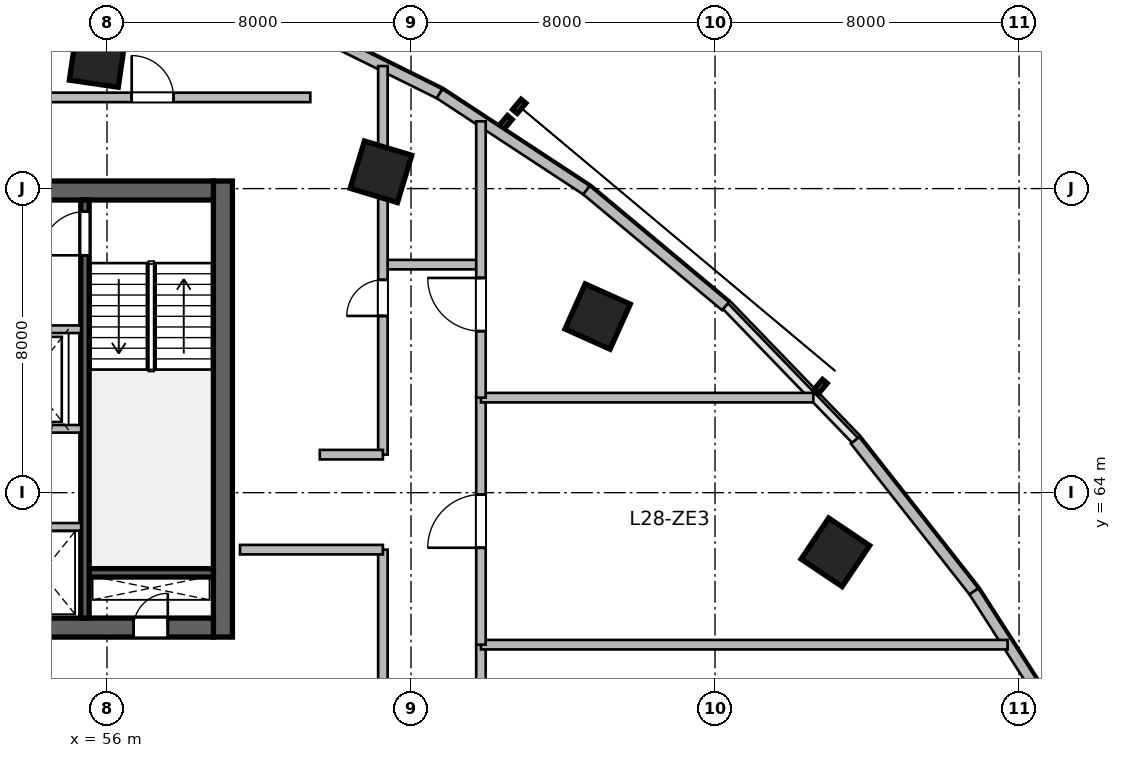
"""IFC4 building model, lengths in metres.
Left out: names, types, materials, properties, quantities, classifications, styles, units other than length and angle.
Written with IfcOpenShell. Run it as: python <this file> out.ifc"""

import sys

from ifc_helpers import new_model, si_unit, direction, frame, frame_2d, origin, origin_2d, place, context, subcontext, project, spatial, rectangle, extrude, source, transform, mapped, element, fill, save


model = new_model("IFC4")
c1 = context("Model", 3, precision=1e-05, world=origin(), true_north=direction((0.0, 1.0)))
c2 = subcontext(c1, "Body", "Model", "MODEL_VIEW")
j1 = project(units=[si_unit("LENGTHUNIT", "METRE"), si_unit("PLANEANGLEUNIT", "RADIAN")], contexts=[c1])
p1 = place(None, origin())
s1 = spatial("IfcSite", under=j1, at=p1, CompositionType="ELEMENT")
p2 = place(p1, origin())
s2 = spatial("IfcBuilding", under=s1, at=p2, CompositionType="ELEMENT")
p3 = place(p2, frame((0.0, 0.0, 119.4)))
s3 = spatial("IfcBuildingStorey", under=s2, at=p3, CompositionType="ELEMENT", Elevation=119.4)
m1 = source(origin(), c2, "Body", "SweptSolid", [
    extrude(rectangle(XDim=12.0, YDim=0.5, at=frame_2d((6.0, 0.0))), origin(), (0.0, 0.0, 1.0), 3.9),
])
p4 = place(p3, frame((59.05, 60.2, 0.0), z_axis=(0.0, 0.0, 1.0), x_axis=(0.0, 1.0, 0.0)))
e1 = element("IfcWall", 1, at=p4, inside=s3, PredefinedType="SHEAR", context=c2, shape_type="MappedRepresentation", body=[
    mapped(m1, transform((0.0, 0.0, 0.0), scale=1.0)),
])
m2 = source(origin(), c2, "Body", "SweptSolid", [
    extrude(rectangle(XDim=21.6, YDim=0.5, at=frame_2d((10.8, 0.0))), origin(), (0.0, 0.0, 1.0), 3.9),
])
p5 = place(p3, frame((37.2, 60.45, 0.0), z_axis=(0.0, 0.0, 1.0), x_axis=(1.0, 0.0, 0.0)))
e2 = element("IfcWall", 2, at=p5, inside=s3, PredefinedType="SHEAR", context=c2, shape_type="MappedRepresentation", body=[
    mapped(m2, transform((0.0, 0.0, 0.0), scale=1.0)),
])
p6 = place(p5, frame((1.1, 0.0, 0.0)))
e3 = element("IfcOpeningElement", 3, at=p6, cuts=e2, PredefinedType="OPENING", context=c2, shape_type="SweptSolid", body=[
    extrude(rectangle(XDim=1.15, YDim=2.15, at=frame_2d((0.575, 1.075))), frame((0.0, 0.26, 0.0), z_axis=(0.0, -1.0, 0.0), x_axis=(1.0, 0.0, 0.0)), (0.0, 0.0, 1.0), 0.52),
])
p7 = place(p5, frame((19.5, 0.0, 0.0)))
e4 = element("IfcOpeningElement", 4, at=p7, cuts=e2, PredefinedType="OPENING", context=c2, shape_type="SweptSolid", body=[
    extrude(rectangle(XDim=0.9, YDim=2.1, at=frame_2d((0.45, 1.05))), frame((0.0, 0.26, 0.0), z_axis=(0.0, -1.0, 0.0), x_axis=(1.0, 0.0, 0.0)), (0.0, 0.0, 1.0), 0.52),
])
p8 = place(p5, frame((12.02, 0.0, 0.0)))
e5 = element("IfcOpeningElement", 5, at=p8, cuts=e2, PredefinedType="OPENING", context=c2, shape_type="SweptSolid", body=[
    extrude(rectangle(XDim=1.6, YDim=2.15, at=frame_2d((0.8, 1.075))), frame((0.0, 0.26, 0.0), z_axis=(0.0, -1.0, 0.0), x_axis=(1.0, 0.0, 0.0)), (0.0, 0.0, 1.0), 0.52),
])
p9 = place(p3, frame((37.2, 71.95, 0.0), z_axis=(0.0, 0.0, 1.0), x_axis=(1.0, 0.0, 0.0)))
e6 = element("IfcWall", 6, at=p9, inside=s3, PredefinedType="SHEAR", context=c2, shape_type="MappedRepresentation", body=[
    mapped(m2, transform((0.0, 0.0, 0.0), scale=1.0)),
])
p10 = place(p9, frame((1.2, 0.0, 0.0)))
e7 = element("IfcOpeningElement", 7, at=p10, cuts=e6, PredefinedType="OPENING", context=c2, shape_type="SweptSolid", body=[
    extrude(rectangle(XDim=0.9, YDim=2.1, at=frame_2d((0.45, 1.05))), frame((0.0, 0.26, 0.0), z_axis=(0.0, -1.0, 0.0), x_axis=(1.0, 0.0, 0.0)), (0.0, 0.0, 1.0), 0.52),
])
p11 = place(p9, frame((14.7, 0.0, 0.0)))
e8 = element("IfcOpeningElement", 8, at=p11, cuts=e6, PredefinedType="OPENING", context=c2, shape_type="SweptSolid", body=[
    extrude(rectangle(XDim=1.2, YDim=2.15, at=frame_2d((0.6, 1.075))), frame((0.0, 0.26, 0.0), z_axis=(0.0, -1.0, 0.0), x_axis=(1.0, 0.0, 0.0)), (0.0, 0.0, 1.0), 0.52),
])
p12 = place(p9, frame((4.15, 0.0, 0.0)))
e9 = element("IfcOpeningElement", 9, at=p12, cuts=e6, PredefinedType="OPENING", context=c2, shape_type="SweptSolid", body=[
    extrude(rectangle(XDim=1.3, YDim=2.15, at=frame_2d((0.65, 1.075))), frame((0.0, 0.26, 0.0), z_axis=(0.0, -1.0, 0.0), x_axis=(1.0, 0.0, 0.0)), (0.0, 0.0, 1.0), 0.52),
])
p13 = place(p9, frame((7.25, 0.0, 0.0)))
e10 = element("IfcOpeningElement", 10, at=p13, cuts=e6, PredefinedType="OPENING", context=c2, shape_type="SweptSolid", body=[
    extrude(rectangle(XDim=0.9, YDim=2.1, at=frame_2d((0.45, 1.05))), frame((0.0, 0.26, 0.0), z_axis=(0.0, -1.0, 0.0), x_axis=(1.0, 0.0, 0.0)), (0.0, 0.0, 1.0), 0.52),
])
m3 = source(origin(), c2, "Body", "SweptSolid", [
    extrude(rectangle(XDim=3.27, YDim=0.22, at=frame_2d((1.635, 0.0))), origin(), (0.0, 0.0, 1.0), 3.9),
])
p14 = place(p3, frame((55.53, 61.89, 0.0), z_axis=(0.0, 0.0, 1.0), x_axis=(1.0, 0.0, 0.0)))
e11 = element("IfcWall", 11, at=p14, inside=s3, PredefinedType="SHEAR", context=c2, shape_type="MappedRepresentation", body=[
    mapped(m3, transform((0.0, 0.0, 0.0), scale=1.0)),
])
m4 = source(origin(), c2, "Body", "SweptSolid", [
    extrude(rectangle(XDim=11.0, YDim=0.22, at=frame_2d((5.5, 0.0))), origin(), (0.0, 0.0, 1.0), 3.9),
])
p15 = place(p3, frame((55.42, 60.7, 0.0), z_axis=(0.0, 0.0, 1.0), x_axis=(0.0, 1.0, 0.0)))
e12 = element("IfcWall", 12, at=p15, inside=s3, PredefinedType="SHEAR", context=c2, shape_type="MappedRepresentation", body=[
    mapped(m4, transform((0.0, 0.0, 0.0), scale=1.0)),
])
p16 = place(p15, frame((9.545, 0.0, 0.0)))
e13 = element("IfcOpeningElement", 13, at=p16, cuts=e12, PredefinedType="OPENING", context=c2, shape_type="SweptSolid", body=[
    extrude(rectangle(XDim=1.15, YDim=2.15, at=frame_2d((0.575, 1.075))), frame((0.0, 0.12, 0.0), z_axis=(0.0, -1.0, 0.0), x_axis=(1.0, 0.0, 0.0)), (0.0, 0.0, 1.0), 0.24),
])
m5 = source(origin(), c2, "Body", "SweptSolid", [
    extrude(rectangle(XDim=1.3, YDim=1.3, at=origin_2d()), origin(), (0.0, 0.0, 1.0), 3.9),
])
for number, where, z_axis, x_axis in (
    (14, (55.747, 75.404, 0.0), (0.0, 0.0, 1.0), (0.143, 0.99, 0.0)),
    (15, (63.209, 72.442, 0.0), (0.0, 0.0, 1.0), (0.289, 0.957, 0.0)),
    (16, (68.91, 68.633, 0.0), (0.0, 0.0, 1.0), (0.409, 0.912, 0.0)),
    (17, (75.167, 62.43, 0.0), (0.0, 0.0, 1.0), (0.558, 0.83, 0.0)),
):
    element("IfcColumn", number, at=place(p3, frame(where, z_axis=z_axis, x_axis=x_axis)), inside=s3, PredefinedType="COLUMN", context=c2, shape_type="MappedRepresentation", body=[
        mapped(m5, transform((0.0, 0.0, 0.0), scale=1.0)),
    ])
m6 = source(origin(), c2, "Body", "SweptSolid", [
    extrude(rectangle(XDim=4.506, YDim=0.28, at=frame_2d((2.253, 0.0))), origin(), (0.0, 0.0, 1.0), 3.65),
])
p17 = place(p3, frame((60.714, 76.497, 0.0), z_axis=(0.0, 0.0, 1.0), x_axis=(0.89597155075, -0.444111450254, 0.0)))
e18 = element("IfcWall", 18, at=p17, inside=s3, PredefinedType="SOLIDWALL", context=c2, shape_type="MappedRepresentation", body=[
    mapped(m6, transform((0.0, 0.0, 0.0), scale=1.0)),
])
m7 = source(origin(), c2, "Body", "SweptSolid", [
    extrude(rectangle(XDim=4.626, YDim=0.28, at=frame_2d((2.313, 0.0))), origin(), (0.0, 0.0, 1.0), 3.65),
])
p18 = place(p3, frame((64.751, 74.496, 0.0), z_axis=(0.0, 0.0, 1.0), x_axis=(0.83595938331, -0.548791316855, 0.0)))
e19 = element("IfcWall", 19, at=p18, inside=s3, PredefinedType="SOLIDWALL", context=c2, shape_type="MappedRepresentation", body=[
    mapped(m7, transform((0.0, 0.0, 0.0), scale=1.0)),
])
m8 = source(origin(), c2, "Body", "SweptSolid", [
    extrude(rectangle(XDim=4.762, YDim=0.28, at=frame_2d((2.381, 0.0))), origin(), (0.0, 0.0, 1.0), 3.65),
])
p19 = place(p3, frame((68.618, 71.958, 0.0), z_axis=(0.0, 0.0, 1.0), x_axis=(0.767952279762, -0.640507061638, 0.0)))
e20 = element("IfcWall", 20, at=p19, inside=s3, PredefinedType="SOLIDWALL", context=c2, shape_type="MappedRepresentation", body=[
    mapped(m8, transform((0.0, 0.0, 0.0), scale=1.0)),
])
m9 = source(origin(), c2, "Body", "SweptSolid", [
    extrude(rectangle(XDim=5.058, YDim=0.28, at=frame_2d((2.529, 0.0))), origin(), (0.0, 0.0, 1.0), 3.65),
])
p20 = place(p3, frame((75.685, 65.376, 0.0), z_axis=(0.0, 0.0, 1.0), x_axis=(0.618145507434, -0.786063694391, 0.0)))
e21 = element("IfcWall", 21, at=p20, inside=s3, PredefinedType="SOLIDWALL", context=c2, shape_type="MappedRepresentation", body=[
    mapped(m9, transform((0.0, 0.0, 0.0), scale=1.0)),
])
m10 = source(origin(), c2, "Body", "SweptSolid", [
    extrude(rectangle(XDim=5.205, YDim=0.28, at=frame_2d((2.603, 0.0))), origin(), (0.0, 0.0, 1.0), 3.65),
])
p21 = place(p3, frame((78.812, 61.4, 0.0), z_axis=(0.0, 0.0, 1.0), x_axis=(0.540188528895, -0.8415440293, 0.0)))
e22 = element("IfcWall", 22, at=p21, inside=s3, PredefinedType="SOLIDWALL", context=c2, shape_type="MappedRepresentation", body=[
    mapped(m10, transform((0.0, 0.0, 0.0), scale=1.0)),
])
m11 = source(origin(), c2, "Body", "SweptSolid", [
    extrude(rectangle(XDim=5.62, YDim=0.2, at=frame_2d((2.81, 0.0))), origin(), (0.0, 0.0, 1.0), 3.65),
])
p22 = place(p3, frame((49.7, 68.3, 0.0), z_axis=(0.0, 0.0, 1.0), x_axis=(1.0, 0.0, 0.0)))
e23 = element("IfcWall", 23, at=p22, inside=s3, PredefinedType="SOLIDWALL", context=c2, shape_type="MappedRepresentation", body=[
    mapped(m11, transform((0.0, 0.0, 0.0), scale=1.0)),
])
p23 = place(p22, frame((1.6, 0.0, 0.0)))
e24 = element("IfcOpeningElement", 24, at=p23, cuts=e23, PredefinedType="OPENING", context=c2, shape_type="SweptSolid", body=[
    extrude(rectangle(XDim=1.1, YDim=2.15, at=frame_2d((0.55, 1.075))), frame((0.0, 0.11, 0.0), z_axis=(0.0, -1.0, 0.0), x_axis=(1.0, 0.0, 0.0)), (0.0, 0.0, 1.0), 0.22),
])
p24 = place(p22, frame((3.7, 0.0, 0.0)))
e25 = element("IfcOpeningElement", 25, at=p24, cuts=e23, PredefinedType="OPENING", context=c2, shape_type="SweptSolid", body=[
    extrude(rectangle(XDim=1.1, YDim=2.15, at=frame_2d((0.55, 1.075))), frame((0.0, 0.11, 0.0), z_axis=(0.0, -1.0, 0.0), x_axis=(1.0, 0.0, 0.0)), (0.0, 0.0, 1.0), 0.22),
])
p25 = place(p3, frame((49.7, 65.68, 0.0), z_axis=(0.0, 0.0, 1.0), x_axis=(1.0, 0.0, 0.0)))
e26 = element("IfcWall", 26, at=p25, inside=s3, PredefinedType="SOLIDWALL", context=c2, shape_type="MappedRepresentation", body=[
    mapped(m11, transform((0.0, 0.0, 0.0), scale=1.0)),
])
m12 = source(origin(), c2, "Body", "SweptSolid", [
    extrude(rectangle(XDim=4.1, YDim=0.2, at=frame_2d((2.05, 0.0))), origin(), (0.0, 0.0, 1.0), 3.65),
])
p26 = place(p3, frame((51.22, 63.1, 0.0), z_axis=(0.0, 0.0, 1.0), x_axis=(1.0, 0.0, 0.0)))
e27 = element("IfcWall", 27, at=p26, inside=s3, PredefinedType="SOLIDWALL", context=c2, shape_type="MappedRepresentation", body=[
    mapped(m12, transform((0.0, 0.0, 0.0), scale=1.0)),
])
m13 = source(origin(), c2, "Body", "SweptSolid", [
    extrude(rectangle(XDim=2.5, YDim=0.25, at=frame_2d((1.25, 0.0))), origin(), (0.0, 0.0, 1.0), 3.65),
])
p27 = place(p3, frame((63.3, 70.0, 0.0), z_axis=(0.0, 0.0, 1.0), x_axis=(1.0, 0.0, 0.0)))
e28 = element("IfcWall", 28, at=p27, inside=s3, PredefinedType="PARTITIONING", context=c2, shape_type="MappedRepresentation", body=[
    mapped(m13, transform((0.0, 0.0, 0.0), scale=1.0)),
])
m14 = source(origin(), c2, "Body", "SweptSolid", [
    extrude(rectangle(XDim=7.0, YDim=0.25, at=frame_2d((3.5, 0.0))), origin(), (0.0, 0.0, 1.0), 3.093),
])
p28 = place(p3, frame((65.84, 53.0, 0.0), z_axis=(0.0, 0.0, 1.0), x_axis=(0.0, 1.0, 0.0)))
e29 = element("IfcWall", 29, at=p28, inside=s3, PredefinedType="PARTITIONING", context=c2, shape_type="MappedRepresentation", body=[
    mapped(m14, transform((0.0, 0.0, 0.0), scale=1.0)),
])
p29 = place(p28, frame((2.8, 0.0, 0.0)))
e30 = element("IfcOpeningElement", 30, at=p29, cuts=e29, PredefinedType="OPENING", context=c2, shape_type="SweptSolid", body=[
    extrude(rectangle(XDim=1.4, YDim=2.15, at=frame_2d((0.7, 1.075))), frame((0.0, 0.135, 0.0), z_axis=(0.0, -1.0, 0.0), x_axis=(1.0, 0.0, 0.0)), (0.0, 0.0, 1.0), 0.27),
])
m15 = source(origin(), c2, "Body", "SweptSolid", [
    extrude(rectangle(XDim=13.858, YDim=0.25, at=frame_2d((6.929, 0.0))), origin(), (0.0, 0.0, 1.0), 3.65),
])
p30 = place(p3, frame((65.84, 60.0, 0.0), z_axis=(0.0, 0.0, 1.0), x_axis=(1.0, 0.0, 0.0)))
e31 = element("IfcWall", 31, at=p30, inside=s3, PredefinedType="PARTITIONING", context=c2, shape_type="MappedRepresentation", body=[
    mapped(m15, transform((0.0, 0.0, 0.0), scale=1.0)),
])
m16 = source(origin(), c2, "Body", "SweptSolid", [
    extrude(rectangle(XDim=6.5, YDim=0.25, at=frame_2d((3.25, 0.0))), origin(), (0.0, 0.0, 1.0), 2.942),
])
p31 = place(p3, frame((65.84, 60.0, 0.0), z_axis=(0.0, 0.0, 1.0), x_axis=(0.0, 1.0, 0.0)))
e32 = element("IfcWall", 32, at=p31, inside=s3, PredefinedType="PARTITIONING", context=c2, shape_type="MappedRepresentation", body=[
    mapped(m16, transform((0.0, 0.0, 0.0), scale=1.0)),
])
p32 = place(p31, frame((2.55, 0.0, 0.0)))
e33 = element("IfcOpeningElement", 33, at=p32, cuts=e32, PredefinedType="OPENING", context=c2, shape_type="SweptSolid", body=[
    extrude(rectangle(XDim=1.4, YDim=2.15, at=frame_2d((0.7, 1.075))), frame((0.0, 0.135, 0.0), z_axis=(0.0, -1.0, 0.0), x_axis=(1.0, 0.0, 0.0)), (0.0, 0.0, 1.0), 0.27),
])
m17 = source(origin(), c2, "Body", "SweptSolid", [
    extrude(rectangle(XDim=8.746, YDim=0.25, at=frame_2d((4.373, 0.0))), origin(), (0.0, 0.0, 1.0), 3.65),
])
p33 = place(p3, frame((65.84, 66.5, 0.0), z_axis=(0.0, 0.0, 1.0), x_axis=(1.0, 0.0, 0.0)))
e34 = element("IfcWall", 34, at=p33, inside=s3, PredefinedType="PARTITIONING", context=c2, shape_type="MappedRepresentation", body=[
    mapped(m17, transform((0.0, 0.0, 0.0), scale=1.0)),
])
m18 = source(origin(), c2, "Body", "SweptSolid", [
    extrude(rectangle(XDim=7.27, YDim=0.25, at=frame_2d((3.635, 0.0))), origin(), (0.0, 0.0, 1.0), 3.65),
])
p34 = place(p3, frame((65.84, 66.5, 0.0), z_axis=(0.0, 0.0, 1.0), x_axis=(0.0, 1.0, 0.0)))
e35 = element("IfcWall", 35, at=p34, inside=s3, PredefinedType="PARTITIONING", context=c2, shape_type="MappedRepresentation", body=[
    mapped(m18, transform((0.0, 0.0, 0.0), scale=1.0)),
])
p35 = place(p34, frame((1.75, 0.0, 0.0)))
e36 = element("IfcOpeningElement", 36, at=p35, cuts=e35, PredefinedType="OPENING", context=c2, shape_type="SweptSolid", body=[
    extrude(rectangle(XDim=1.4, YDim=2.15, at=frame_2d((0.7, 1.075))), frame((0.0, 0.135, 0.0), z_axis=(0.0, -1.0, 0.0), x_axis=(1.0, 0.0, 0.0)), (0.0, 0.0, 1.0), 0.27),
])
m19 = source(origin(), c2, "Body", "SweptSolid", [
    extrude(rectangle(XDim=9.2, YDim=0.25, at=frame_2d((4.6, 0.0))), origin(), (0.0, 0.0, 1.0), 3.022),
])
p36 = place(p3, frame((52.15, 74.4, 0.0), z_axis=(0.0, 0.0, 1.0), x_axis=(1.0, 0.0, 0.0)))
e37 = element("IfcWall", 37, at=p36, inside=s3, PredefinedType="PARTITIONING", context=c2, shape_type="MappedRepresentation", body=[
    mapped(m19, transform((0.0, 0.0, 0.0), scale=1.0)),
])
p37 = place(p36, frame((4.5, 0.0, 0.0)))
e38 = element("IfcOpeningElement", 38, at=p37, cuts=e37, PredefinedType="OPENING", context=c2, shape_type="SweptSolid", body=[
    extrude(rectangle(XDim=1.1, YDim=2.15, at=frame_2d((0.55, 1.075))), frame((0.0, 0.135, 0.0), z_axis=(0.0, -1.0, 0.0), x_axis=(1.0, 0.0, 0.0)), (0.0, 0.0, 1.0), 0.27),
])
m20 = source(origin(), c2, "Body", "SweptSolid", [
    extrude(rectangle(XDim=16.706, YDim=0.25, at=frame_2d((8.353, 0.0))), origin(), (0.0, 0.0, 1.0), 2.942),
])
p38 = place(p3, frame((63.26, 45.794, 0.0), z_axis=(0.0, 0.0, 1.0), x_axis=(0.0, 1.0, 0.0)))
e39 = element("IfcWall", 39, at=p38, inside=s3, PredefinedType="PARTITIONING", context=c2, shape_type="MappedRepresentation", body=[
    mapped(m20, transform((0.0, 0.0, 0.0), scale=1.0)),
])
p39 = place(p38, frame((7.878, 0.0, 0.0)))
e40 = element("IfcOpeningElement", 40, at=p39, cuts=e39, PredefinedType="OPENING", context=c2, shape_type="SweptSolid", body=[
    extrude(rectangle(XDim=0.95, YDim=2.1, at=frame_2d((0.475, 1.05))), frame((0.0, 0.135, 0.0), z_axis=(0.0, -1.0, 0.0), x_axis=(1.0, 0.0, 0.0)), (0.0, 0.0, 1.0), 0.27),
])
m21 = source(origin(), c2, "Body", "SweptSolid", [
    extrude(rectangle(XDim=3.76, YDim=0.25, at=frame_2d((1.88, 0.0))), origin(), (0.0, 0.0, 1.0), 3.65),
])
p40 = place(p3, frame((59.5, 62.5, 0.0), z_axis=(0.0, 0.0, 1.0), x_axis=(1.0, 0.0, 0.0)))
e41 = element("IfcWall", 41, at=p40, inside=s3, PredefinedType="PARTITIONING", context=c2, shape_type="MappedRepresentation", body=[
    mapped(m21, transform((0.0, 0.0, 0.0), scale=1.0)),
])
m22 = source(origin(), c2, "Body", "SweptSolid", [
    extrude(rectangle(XDim=10.224, YDim=0.25, at=frame_2d((5.112, 0.0))), origin(), (0.0, 0.0, 1.0), 3.65),
])
p41 = place(p3, frame((63.26, 65.0, 0.0), z_axis=(0.0, 0.0, 1.0), x_axis=(0.0, 1.0, 0.0)))
e42 = element("IfcWall", 42, at=p41, inside=s3, PredefinedType="PARTITIONING", context=c2, shape_type="MappedRepresentation", body=[
    mapped(m22, transform((0.0, 0.0, 0.0), scale=1.0)),
])
p42 = place(p41, frame((3.65, 0.0, 0.0)))
e43 = element("IfcOpeningElement", 43, at=p42, cuts=e42, PredefinedType="OPENING", context=c2, shape_type="SweptSolid", body=[
    extrude(rectangle(XDim=0.95, YDim=2.1, at=frame_2d((0.475, 1.05))), frame((0.0, 0.135, 0.0), z_axis=(0.0, -1.0, 0.0), x_axis=(1.0, 0.0, 0.0)), (0.0, 0.0, 1.0), 0.27),
])
m23 = source(origin(), c2, "Body", "SweptSolid", [
    extrude(rectangle(XDim=1.66, YDim=0.25, at=frame_2d((0.83, 0.0))), origin(), (0.0, 0.0, 1.0), 3.65),
])
p43 = place(p3, frame((61.6, 65.0, 0.0), z_axis=(0.0, 0.0, 1.0), x_axis=(1.0, 0.0, 0.0)))
e44 = element("IfcWall", 44, at=p43, inside=s3, PredefinedType="PARTITIONING", context=c2, shape_type="MappedRepresentation", body=[
    mapped(m23, transform((0.0, 0.0, 0.0), scale=1.0)),
])
m24 = source(origin(), c2, "Body", "SweptSolid", [
    extrude(rectangle(XDim=0.9, YDim=2.1, at=frame_2d((0.45, 1.05))), frame((0.0, 0.025, 0.0), z_axis=(0.0, -1.0, 0.0), x_axis=(1.0, 0.0, 0.0)), (0.0, 0.0, 1.0), 0.05),
])
p44 = place(p7, origin())
e45 = element("IfcDoor", 45, at=p44, inside=s3, OperationType="SINGLE_SWING_RIGHT", PredefinedType="DOOR", context=c2, shape_type="MappedRepresentation", body=[
    mapped(m24, transform((0.0, 0.0, 0.0), scale=1.0)),
])
fill(e4, e45)
m25 = source(origin(), c2, "Body", "SweptSolid", [
    extrude(rectangle(XDim=1.15, YDim=2.15, at=frame_2d((0.575, 1.075))), frame((0.0, 0.025, 0.0), z_axis=(0.0, -1.0, 0.0), x_axis=(1.0, 0.0, 0.0)), (0.0, 0.0, 1.0), 0.05),
])
p45 = place(p16, origin())
e46 = element("IfcDoor", 46, at=p45, inside=s3, OperationType="SINGLE_SWING_LEFT", PredefinedType="DOOR", context=c2, shape_type="MappedRepresentation", body=[
    mapped(m25, transform((0.0, 0.0, 0.0), scale=1.0)),
])
fill(e13, e46)
m26 = source(origin(), c2, "Body", "SweptSolid", [
    extrude(rectangle(XDim=1.4, YDim=2.15, at=frame_2d((0.7, 1.075))), frame((0.0, 0.025, 0.0), z_axis=(0.0, -1.0, 0.0), x_axis=(1.0, 0.0, 0.0)), (0.0, 0.0, 1.0), 0.05),
])
p46 = place(p32, origin())
e47 = element("IfcDoor", 47, at=p46, inside=s3, OperationType="SINGLE_SWING_LEFT", PredefinedType="DOOR", context=c2, shape_type="MappedRepresentation", body=[
    mapped(m26, transform((0.0, 0.0, 0.0), scale=1.0)),
])
fill(e33, e47)
p47 = place(p35, origin())
e48 = element("IfcDoor", 48, at=p47, inside=s3, OperationType="SINGLE_SWING_RIGHT", PredefinedType="DOOR", context=c2, shape_type="MappedRepresentation", body=[
    mapped(m26, transform((0.0, 0.0, 0.0), scale=1.0)),
])
fill(e36, e48)
m27 = source(origin(), c2, "Body", "SweptSolid", [
    extrude(rectangle(XDim=1.1, YDim=2.15, at=frame_2d((0.55, 1.075))), frame((0.0, 0.025, 0.0), z_axis=(0.0, -1.0, 0.0), x_axis=(1.0, 0.0, 0.0)), (0.0, 0.0, 1.0), 0.05),
])
p48 = place(p37, origin())
e49 = element("IfcDoor", 49, at=p48, inside=s3, OperationType="SINGLE_SWING_LEFT", PredefinedType="DOOR", context=c2, shape_type="MappedRepresentation", body=[
    mapped(m27, transform((0.0, 0.0, 0.0), scale=1.0)),
])
fill(e38, e49)
m28 = source(origin(), c2, "Body", "SweptSolid", [
    extrude(rectangle(XDim=0.95, YDim=2.1, at=frame_2d((0.475, 1.05))), frame((0.0, 0.025, 0.0), z_axis=(0.0, -1.0, 0.0), x_axis=(1.0, 0.0, 0.0)), (0.0, 0.0, 1.0), 0.05),
])
p49 = place(p42, origin())
e50 = element("IfcDoor", 50, at=p49, inside=s3, OperationType="SINGLE_SWING_LEFT", PredefinedType="DOOR", context=c2, shape_type="MappedRepresentation", body=[
    mapped(m28, transform((0.0, 0.0, 0.0), scale=1.0)),
])
fill(e43, e50)
save(model, sys.argv[1])
